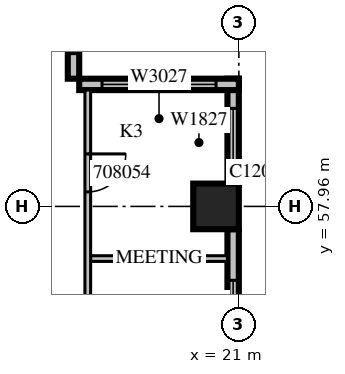
"""IFC4 building model, lengths in metres.
Left out: names, types, materials, properties, quantities, classifications, styles, units other than length and angle.
Written with IfcOpenShell. Run it as: python <this file> out.ifc"""

import sys

from ifc_helpers import new_model, si_unit, direction, frame, frame_2d, origin, origin_2d, place, context, subcontext, project, spatial, rectangle, extrude, source, transform, mapped, element, fill, save


model = new_model("IFC4")
c1 = context("Model", 3, precision=1e-05, world=origin(), true_north=direction((0.0, 1.0)))
c2 = subcontext(c1, "Body", "Model", "MODEL_VIEW")
j1 = project(units=[si_unit("LENGTHUNIT", "METRE"), si_unit("PLANEANGLEUNIT", "RADIAN")], contexts=[c1])
p1 = place(None, origin())
s1 = spatial("IfcSite", under=j1, at=p1, CompositionType="ELEMENT")
p2 = place(p1, origin())
s2 = spatial("IfcBuilding", under=s1, at=p2, CompositionType="ELEMENT")
p3 = place(p2, frame((0.0, 0.0, 44.7)))
s3 = spatial("IfcBuildingStorey", under=s2, at=p3, CompositionType="ELEMENT", Elevation=44.7)
m1 = source(origin(), c2, "Body", "SweptSolid", [
    extrude(rectangle(XDim=1.2, YDim=1.2, at=origin_2d()), origin(), (0.0, 0.0, 1.0), 4.2),
])
p4 = place(p3, frame((20.4, 57.96, 0.0), z_axis=(0.0, 0.0, 1.0), x_axis=(1.0, 0.0, 0.0)))
e1 = element("IfcColumn", 1, at=p4, inside=s3, PredefinedType="COLUMN", context=c2, shape_type="MappedRepresentation", body=[
    mapped(m1, transform((0.0, 0.0, 0.0), scale=1.0)),
])
m2 = source(origin(), c2, "Body", "SweptSolid", [
    extrude(rectangle(XDim=4.68, YDim=0.3, at=frame_2d((2.34, 0.0))), origin(), (0.0, 0.0, 1.0), 3.8),
])
p5 = place(p3, frame((20.85, 52.68, 0.0), z_axis=(0.0, 0.0, 1.0), x_axis=(0.0, 1.0, 0.0)))
e2 = element("IfcWall", 2, at=p5, inside=s3, PredefinedType="STANDARD", context=c2, shape_type="MappedRepresentation", body=[
    mapped(m2, transform((0.0, 0.0, 0.0), scale=1.0)),
])
m3 = source(origin(), c2, "Body", "SweptSolid", [
    extrude(rectangle(XDim=2.4, YDim=2.7, at=frame_2d((1.2, 1.35))), frame((0.0, 0.16, 0.0), z_axis=(0.0, -1.0, 0.0), x_axis=(1.0, 0.0, 0.0)), (0.0, 0.0, 1.0), 0.32),
])
p6 = place(p5, frame((0.936, 0.0, 0.6)))
e3 = element("IfcOpeningElement", 3, at=p6, cuts=e2, PredefinedType="OPENING", context=c2, shape_type="MappedRepresentation", body=[
    mapped(m3, transform((0.0, 0.0, 0.0), scale=1.0)),
])
m4 = source(origin(), c2, "Body", "SweptSolid", [
    extrude(rectangle(XDim=2.76, YDim=0.3, at=frame_2d((1.38, 0.0))), origin(), (0.0, 0.0, 1.0), 3.8),
])
p7 = place(p3, frame((20.85, 58.56, 0.0), z_axis=(0.0, 0.0, 1.0), x_axis=(0.0, 1.0, 0.0)))
e4 = element("IfcWall", 4, at=p7, inside=s3, PredefinedType="STANDARD", context=c2, shape_type="MappedRepresentation", body=[
    mapped(m4, transform((0.0, 0.0, 0.0), scale=1.0)),
])
m5 = source(origin(), c2, "Body", "SweptSolid", [
    extrude(rectangle(XDim=1.8, YDim=2.7, at=frame_2d((0.9, 1.35))), frame((0.0, 0.16, 0.0), z_axis=(0.0, -1.0, 0.0), x_axis=(1.0, 0.0, 0.0)), (0.0, 0.0, 1.0), 0.32),
])
p8 = place(p7, frame((0.18, 0.0, 0.6)))
e5 = element("IfcOpeningElement", 5, at=p8, cuts=e4, PredefinedType="OPENING", context=c2, shape_type="MappedRepresentation", body=[
    mapped(m5, transform((0.0, 0.0, 0.0), scale=1.0)),
])
m6 = source(origin(), c2, "Body", "SweptSolid", [
    extrude(rectangle(XDim=4.2, YDim=0.3, at=frame_2d((2.1, 0.0))), origin(), (0.0, 0.0, 1.0), 3.8),
])
p9 = place(p3, frame((21.0, 61.17, 0.0), z_axis=(0.0, 0.0, 1.0), x_axis=(-1.0, 0.0, 0.0)))
e6 = element("IfcWall", 6, at=p9, inside=s3, PredefinedType="STANDARD", context=c2, shape_type="MappedRepresentation", body=[
    mapped(m6, transform((0.0, 0.0, 0.0), scale=1.0)),
])
m7 = source(origin(), c2, "Body", "SweptSolid", [
    extrude(rectangle(XDim=3.0, YDim=2.7, at=frame_2d((1.5, 1.35))), frame((0.0, 0.16, 0.0), z_axis=(0.0, -1.0, 0.0), x_axis=(1.0, 0.0, 0.0)), (0.0, 0.0, 1.0), 0.32),
])
p10 = place(p9, frame((0.6, 0.0, 0.6)))
e7 = element("IfcOpeningElement", 7, at=p10, cuts=e6, PredefinedType="OPENING", context=c2, shape_type="MappedRepresentation", body=[
    mapped(m7, transform((0.0, 0.0, 0.0), scale=1.0)),
])
m8 = source(origin(), c2, "Body", "SweptSolid", [
    extrude(rectangle(XDim=2.52, YDim=0.3, at=frame_2d((1.26, 0.0))), origin(), (0.0, 0.0, 1.0), 3.8),
])
p11 = place(p3, frame((16.65, 61.32, 0.0), z_axis=(0.0, 0.0, 1.0), x_axis=(0.0, 1.0, 0.0)))
e8 = element("IfcWall", 8, at=p11, inside=s3, PredefinedType="STANDARD", context=c2, shape_type="MappedRepresentation", body=[
    mapped(m8, transform((0.0, 0.0, 0.0), scale=1.0)),
])
m9 = source(origin(), c2, "Body", "SweptSolid", [
    extrude(rectangle(XDim=1.2, YDim=2.7, at=frame_2d((0.6, 1.35))), frame((0.0, 0.16, 0.0), z_axis=(0.0, -1.0, 0.0), x_axis=(1.0, 0.0, 0.0)), (0.0, 0.0, 1.0), 0.32),
])
p12 = place(p11, frame((0.66, 0.0, 0.6)))
e9 = element("IfcOpeningElement", 9, at=p12, cuts=e8, PredefinedType="OPENING", context=c2, shape_type="MappedRepresentation", body=[
    mapped(m9, transform((0.0, 0.0, 0.0), scale=1.0)),
])
m10 = source(origin(), c2, "Body", "SweptSolid", [
    extrude(rectangle(XDim=3.6, YDim=0.15, at=frame_2d((1.8, 0.0))), origin(), (0.0, 0.0, 1.0), 3.8),
])
p13 = place(p3, frame((17.1, 56.587, 0.0), z_axis=(0.0, 0.0, 1.0), x_axis=(1.0, 0.0, 0.0)))
e10 = element("IfcWall", 10, at=p13, inside=s3, PredefinedType="PARTITIONING", context=c2, shape_type="MappedRepresentation", body=[
    mapped(m10, transform((0.0, 0.0, 0.0), scale=1.0)),
])
m11 = source(origin(), c2, "Body", "SweptSolid", [
    extrude(rectangle(XDim=31.62, YDim=0.15, at=frame_2d((15.81, 0.0))), origin(), (0.0, 0.0, 1.0), 3.3),
])
p14 = place(p3, frame((17.025, 61.02, 0.0), z_axis=(0.0, 0.0, 1.0), x_axis=(0.0, -1.0, 0.0)))
e11 = element("IfcWall", 11, at=p14, inside=s3, PredefinedType="PARTITIONING", context=c2, shape_type="MappedRepresentation", body=[
    mapped(m11, transform((0.0, 0.0, 0.0), scale=1.0)),
])
m12 = source(origin(), c2, "Body", "SweptSolid", [
    extrude(rectangle(XDim=1.0, YDim=2.1, at=frame_2d((0.5, 1.05))), frame((0.0, 0.085, 0.0), z_axis=(0.0, -1.0, 0.0), x_axis=(1.0, 0.0, 0.0)), (0.0, 0.0, 1.0), 0.17),
])
p15 = place(p14, frame((29.263, 0.0, 0.0)))
e12 = element("IfcOpeningElement", 12, at=p15, cuts=e11, PredefinedType="OPENING", context=c2, shape_type="MappedRepresentation", body=[
    mapped(m12, transform((0.0, 0.0, 0.0), scale=1.0)),
])
p16 = place(p14, frame((25.951, 0.0, 0.0)))
e13 = element("IfcOpeningElement", 13, at=p16, cuts=e11, PredefinedType="OPENING", context=c2, shape_type="MappedRepresentation", body=[
    mapped(m12, transform((0.0, 0.0, 0.0), scale=1.0)),
])
p17 = place(p14, frame((23.608, 0.0, 0.0)))
e14 = element("IfcOpeningElement", 14, at=p17, cuts=e11, PredefinedType="OPENING", context=c2, shape_type="MappedRepresentation", body=[
    mapped(m12, transform((0.0, 0.0, 0.0), scale=1.0)),
])
p18 = place(p14, frame((20.62, 0.0, 0.0)))
e15 = element("IfcOpeningElement", 15, at=p18, cuts=e11, PredefinedType="OPENING", context=c2, shape_type="MappedRepresentation", body=[
    mapped(m12, transform((0.0, 0.0, 0.0), scale=1.0)),
])
p19 = place(p14, frame((16.293, 0.0, 0.0)))
e16 = element("IfcOpeningElement", 16, at=p19, cuts=e11, PredefinedType="OPENING", context=c2, shape_type="MappedRepresentation", body=[
    mapped(m12, transform((0.0, 0.0, 0.0), scale=1.0)),
])
p20 = place(p14, frame((12.314, 0.0, 0.0)))
e17 = element("IfcOpeningElement", 17, at=p20, cuts=e11, PredefinedType="OPENING", context=c2, shape_type="MappedRepresentation", body=[
    mapped(m12, transform((0.0, 0.0, 0.0), scale=1.0)),
])
p21 = place(p14, frame((9.501, 0.0, 0.0)))
e18 = element("IfcOpeningElement", 18, at=p21, cuts=e11, PredefinedType="OPENING", context=c2, shape_type="MappedRepresentation", body=[
    mapped(m12, transform((0.0, 0.0, 0.0), scale=1.0)),
])
p22 = place(p14, frame((6.186, 0.0, 0.0)))
e19 = element("IfcOpeningElement", 19, at=p22, cuts=e11, PredefinedType="OPENING", context=c2, shape_type="MappedRepresentation", body=[
    mapped(m12, transform((0.0, 0.0, 0.0), scale=1.0)),
])
p23 = place(p14, frame((1.679, 0.0, 0.0)))
e20 = element("IfcOpeningElement", 20, at=p23, cuts=e11, PredefinedType="OPENING", context=c2, shape_type="MappedRepresentation", body=[
    mapped(m12, transform((0.0, 0.0, 0.0), scale=1.0)),
])
m13 = source(origin(), c2, "Body", "SweptSolid", [
    extrude(rectangle(XDim=2.4, YDim=2.7, at=frame_2d((1.2, 1.35))), frame((0.0, 0.03, 0.0), z_axis=(0.0, -1.0, 0.0), x_axis=(1.0, 0.0, 0.0)), (0.0, 0.0, 1.0), 0.06),
])
p24 = place(p6, origin())
e21 = element("IfcWindow", 21, at=p24, inside=s3, PartitioningType="SINGLE_PANEL", PredefinedType="WINDOW", context=c2, shape_type="MappedRepresentation", body=[
    mapped(m13, transform((0.0, 0.0, 0.0), scale=1.0)),
])
fill(e3, e21)
m14 = source(origin(), c2, "Body", "SweptSolid", [
    extrude(rectangle(XDim=1.8, YDim=2.7, at=frame_2d((0.9, 1.35))), frame((0.0, 0.03, 0.0), z_axis=(0.0, -1.0, 0.0), x_axis=(1.0, 0.0, 0.0)), (0.0, 0.0, 1.0), 0.06),
])
p25 = place(p8, origin())
e22 = element("IfcWindow", 22, at=p25, inside=s3, PartitioningType="SINGLE_PANEL", PredefinedType="WINDOW", context=c2, shape_type="MappedRepresentation", body=[
    mapped(m14, transform((0.0, 0.0, 0.0), scale=1.0)),
])
fill(e5, e22)
m15 = source(origin(), c2, "Body", "SweptSolid", [
    extrude(rectangle(XDim=3.0, YDim=2.7, at=frame_2d((1.5, 1.35))), frame((0.0, 0.03, 0.0), z_axis=(0.0, -1.0, 0.0), x_axis=(1.0, 0.0, 0.0)), (0.0, 0.0, 1.0), 0.06),
])
p26 = place(p10, origin())
e23 = element("IfcWindow", 23, at=p26, inside=s3, PartitioningType="SINGLE_PANEL", PredefinedType="WINDOW", context=c2, shape_type="MappedRepresentation", body=[
    mapped(m15, transform((0.0, 0.0, 0.0), scale=1.0)),
])
fill(e7, e23)
m16 = source(origin(), c2, "Body", "SweptSolid", [
    extrude(rectangle(XDim=1.2, YDim=2.7, at=frame_2d((0.6, 1.35))), frame((0.0, 0.03, 0.0), z_axis=(0.0, -1.0, 0.0), x_axis=(1.0, 0.0, 0.0)), (0.0, 0.0, 1.0), 0.06),
])
p27 = place(p12, origin())
e24 = element("IfcWindow", 24, at=p27, inside=s3, PartitioningType="SINGLE_PANEL", PredefinedType="WINDOW", context=c2, shape_type="MappedRepresentation", body=[
    mapped(m16, transform((0.0, 0.0, 0.0), scale=1.0)),
])
fill(e9, e24)
m17 = source(origin(), c2, "Body", "SweptSolid", [
    extrude(rectangle(XDim=1.0, YDim=2.1, at=frame_2d((0.5, 1.05))), frame((0.0, 0.025, 0.0), z_axis=(0.0, -1.0, 0.0), x_axis=(1.0, 0.0, 0.0)), (0.0, 0.0, 1.0), 0.05),
])
p28 = place(p23, origin())
e25 = element("IfcDoor", 25, at=p28, inside=s3, OperationType="SINGLE_SWING_LEFT", PredefinedType="DOOR", context=c2, shape_type="MappedRepresentation", body=[
    mapped(m17, transform((0.0, 0.0, 0.0), scale=1.0)),
])
fill(e20, e25)
save(model, sys.argv[1])
